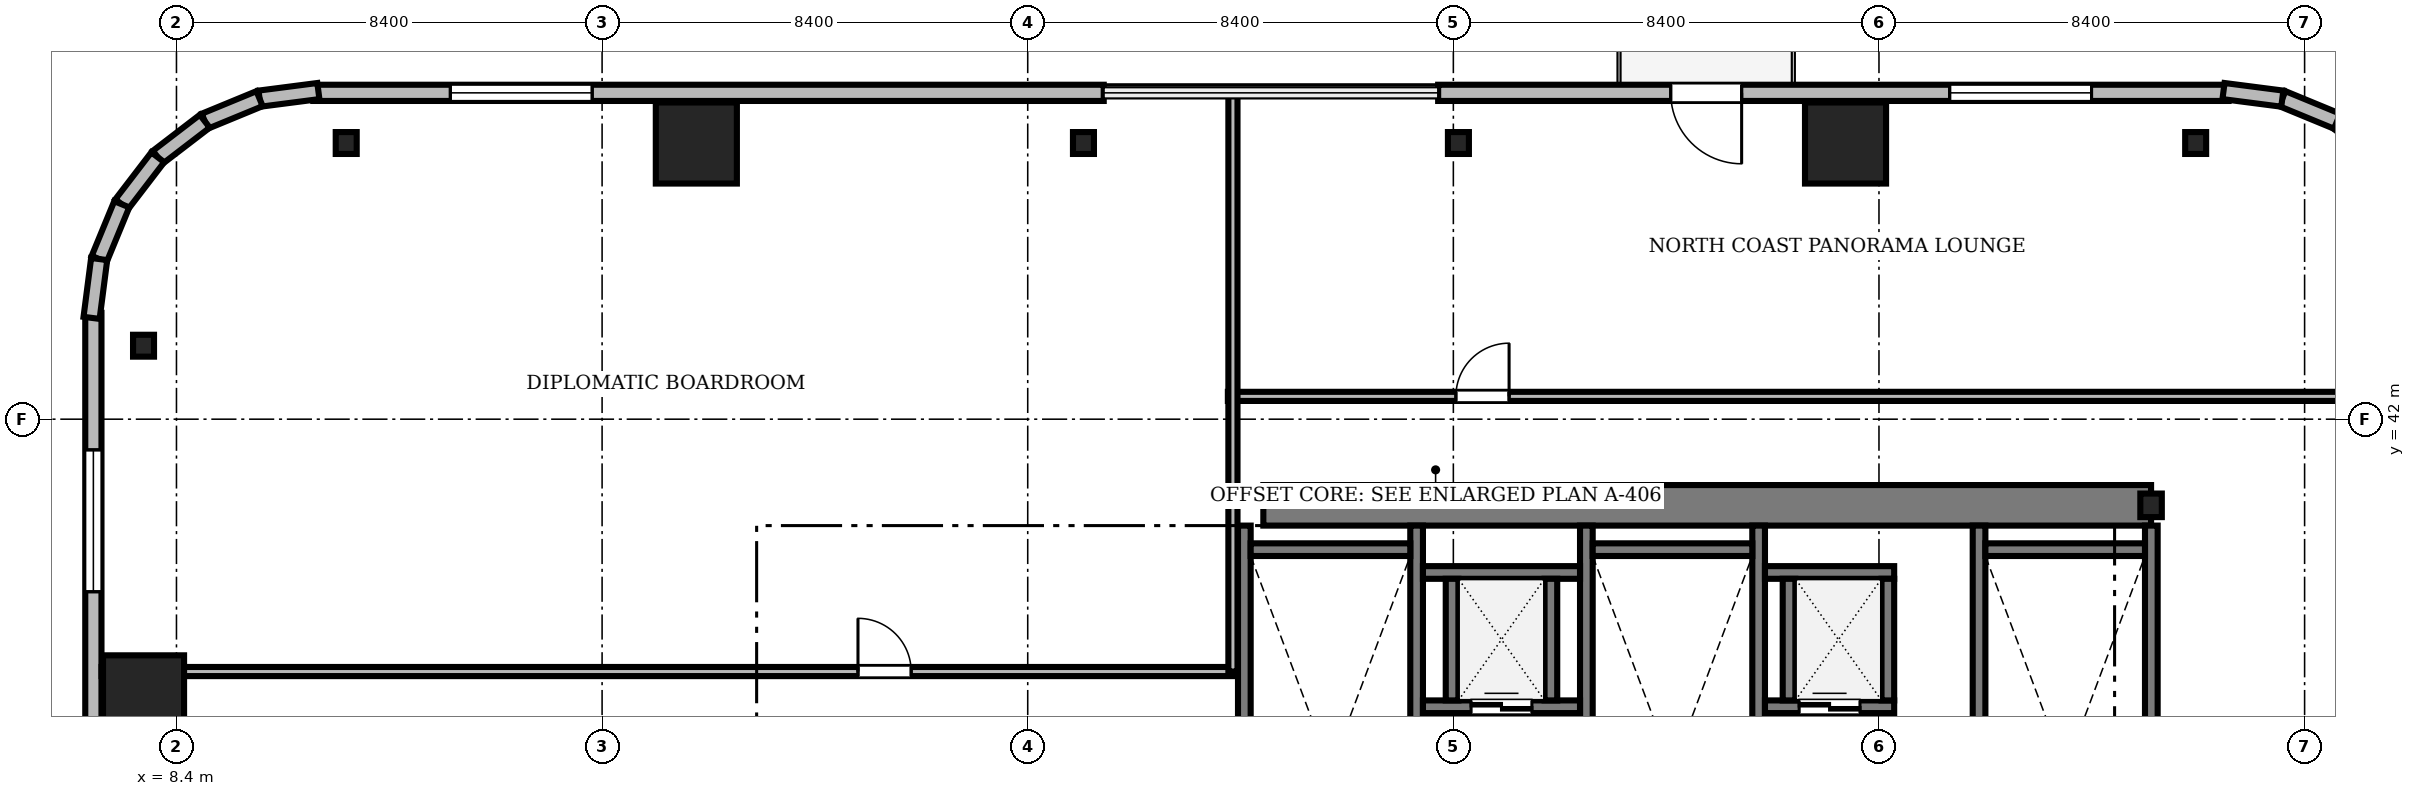
"""IFC4 building model, lengths in metres.
Left out: names, types, materials, properties, quantities, classifications, styles, units other than length and angle.
Written with IfcOpenShell. Run it as: python <this file> out.ifc"""

import sys

from ifc_helpers import new_model, si_unit, direction, frame, frame_2d, origin, origin_2d, place, context, subcontext, project, spatial, rectangle, i_section, extrude, source, transform, mapped, element, fill, save


model = new_model("IFC4")
c1 = context("Model", 3, precision=1e-05, world=origin(), true_north=direction((0.0, 1.0)))
c2 = subcontext(c1, "Body", "Model", "MODEL_VIEW")
j1 = project(units=[si_unit("LENGTHUNIT", "METRE"), si_unit("PLANEANGLEUNIT", "RADIAN")], contexts=[c1])
p1 = place(None, origin())
s1 = spatial("IfcSite", under=j1, at=p1, CompositionType="ELEMENT")
p2 = place(p1, origin())
s2 = spatial("IfcBuilding", under=s1, at=p2, CompositionType="ELEMENT")
p3 = place(p2, frame((0.0, 0.0, 140.9)))
s3 = spatial("IfcBuildingStorey", under=s2, at=p3, CompositionType="ELEMENT", Elevation=140.9)
m1 = source(origin(), c2, "Body", "SweptSolid", [
    extrude(rectangle(XDim=17.52, YDim=0.8, at=frame_2d((8.76, 0.0))), origin(), (0.0, 0.0, 1.0), 3.46),
])
p4 = place(p3, frame((29.85, 40.3, 0.0), z_axis=(0.0, 0.0, 1.0), x_axis=(1.0, 0.0, 0.0)))
e1 = element("IfcWall", 1, at=p4, inside=s3, PredefinedType="SHEAR", context=c2, shape_type="MappedRepresentation", body=[
    mapped(m1, transform((0.0, 0.0, 0.0), scale=1.0)),
])
m2 = source(origin(), c2, "Body", "SweptSolid", [
    extrude(i_section(OverallWidth=0.424, OverallDepth=0.465, WebThickness=0.035, FlangeThickness=0.056, FilletRadius=0.015, at=origin_2d()), origin(), (0.0, 0.0, 1.0), 3.46),
])
p5 = place(p3, frame((47.37, 40.3, 0.0), z_axis=(0.0, 0.0, 1.0), x_axis=(1.0, 0.0, 0.0)))
e2 = element("IfcColumn", 2, at=p5, inside=s3, PredefinedType="COLUMN", context=c2, shape_type="MappedRepresentation", body=[
    mapped(m2, transform((0.0, 0.0, 0.0), scale=1.0)),
])
m3 = source(origin(), c2, "Body", "SweptSolid", [
    extrude(rectangle(XDim=1.6, YDim=1.6, at=origin_2d()), origin(), (0.0, 0.0, 1.0), 3.46),
])
for number, where, z_axis, x_axis in (
    (3, (41.34, 47.45, 0.0), (0.0, 0.0, 1.0), (1.0, 0.0, 0.0)),
    (4, (18.66, 47.45, 0.0), (0.0, 0.0, 1.0), (1.0, 0.0, 0.0)),
    (5, (7.75, 36.54, 0.0), (0.0, 0.0, 1.0), (1.0, 0.0, 0.0)),
):
    element("IfcColumn", number, at=place(p3, frame(where, z_axis=z_axis, x_axis=x_axis)), inside=s3, PredefinedType="COLUMN", context=c2, shape_type="MappedRepresentation", body=[
        mapped(m3, transform((0.0, 0.0, 0.0), scale=1.0)),
    ])
m4 = source(origin(), c2, "Body", "SweptSolid", [
    extrude(i_section(OverallWidth=0.414, OverallDepth=0.432, WebThickness=0.026, FlangeThickness=0.04, FilletRadius=0.015, at=origin_2d()), origin(), (0.0, 0.0, 1.0), 3.46),
])
for number, where, z_axis, x_axis in (
    (6, (48.25, 47.45, 0.0), (0.0, 0.0, 1.0), (1.0, 0.0, 0.0)),
    (7, (33.7, 47.45, 0.0), (0.0, 0.0, 1.0), (1.0, 0.0, 0.0)),
    (8, (26.3, 47.45, 0.0), (0.0, 0.0, 1.0), (1.0, 0.0, 0.0)),
    (9, (11.75, 47.45, 0.0), (0.0, 0.0, 1.0), (1.0, 0.0, 0.0)),
    (10, (7.75, 43.45, 0.0), (0.0, 0.0, 1.0), (1.0, 0.0, 0.0)),
):
    element("IfcColumn", number, at=place(p3, frame(where, z_axis=z_axis, x_axis=x_axis)), inside=s3, PredefinedType="COLUMN", context=c2, shape_type="MappedRepresentation", body=[
        mapped(m4, transform((0.0, 0.0, 0.0), scale=1.0)),
    ])
m5 = source(origin(), c2, "Body", "SweptSolid", [
    extrude(rectangle(XDim=15.6, YDim=0.32, at=frame_2d((7.8, 0.0))), origin(), (0.0, 0.0, 1.0), 3.46),
])
p6 = place(p3, frame((48.9, 48.44, 0.0), z_axis=(0.0, 0.0, 1.0), x_axis=(-1.0, 0.0, 0.0)))
e11 = element("IfcWall", 11, at=p6, inside=s3, PredefinedType="SOLIDWALL", context=c2, shape_type="MappedRepresentation", body=[
    mapped(m5, transform((0.0, 0.0, 0.0), scale=1.0)),
])
m6 = source(origin(), c2, "Body", "SweptSolid", [
    extrude(rectangle(XDim=1.4, YDim=2.3, at=frame_2d((0.7, 1.15))), frame((0.0, 0.17, 0.0), z_axis=(0.0, -1.0, 0.0), x_axis=(1.0, 0.0, 0.0)), (0.0, 0.0, 1.0), 0.34),
])
p7 = place(p6, frame((9.61, 0.0, 0.0)))
e12 = element("IfcOpeningElement", 12, at=p7, cuts=e11, PredefinedType="OPENING", context=c2, shape_type="MappedRepresentation", body=[
    mapped(m6, transform((0.0, 0.0, 0.0), scale=1.0)),
])
m7 = source(origin(), c2, "Body", "SweptSolid", [
    extrude(rectangle(XDim=2.8, YDim=2.4, at=frame_2d((1.4, 1.2))), frame((0.0, 0.17, 0.0), z_axis=(0.0, -1.0, 0.0), x_axis=(1.0, 0.0, 0.0)), (0.0, 0.0, 1.0), 0.34),
])
p8 = place(p6, frame((2.705, 0.0, 0.72)))
e13 = element("IfcOpeningElement", 13, at=p8, cuts=e11, PredefinedType="OPENING", context=c2, shape_type="MappedRepresentation", body=[
    mapped(m7, transform((0.0, 0.0, 0.0), scale=1.0)),
])
p9 = place(p3, frame((26.7, 48.44, 0.0), z_axis=(0.0, 0.0, 1.0), x_axis=(-1.0, 0.0, 0.0)))
e14 = element("IfcWall", 14, at=p9, inside=s3, PredefinedType="SOLIDWALL", context=c2, shape_type="MappedRepresentation", body=[
    mapped(m5, transform((0.0, 0.0, 0.0), scale=1.0)),
])
p10 = place(p9, frame((10.095, 0.0, 0.72)))
e15 = element("IfcOpeningElement", 15, at=p10, cuts=e14, PredefinedType="OPENING", context=c2, shape_type="MappedRepresentation", body=[
    mapped(m7, transform((0.0, 0.0, 0.0), scale=1.0)),
])
m8 = source(origin(), c2, "Body", "SweptSolid", [
    extrude(rectangle(XDim=15.6, YDim=0.32, at=frame_2d((7.8, 0.0))), origin(), (0.0, 0.0, 1.0), 3.46),
])
p11 = place(p3, frame((6.76, 44.1, 0.0), z_axis=(0.0, 0.0, 1.0), x_axis=(0.0, -1.0, 0.0)))
e16 = element("IfcWall", 16, at=p11, inside=s3, PredefinedType="SOLIDWALL", context=c2, shape_type="MappedRepresentation", body=[
    mapped(m8, transform((0.0, 0.0, 0.0), scale=1.0)),
])
p12 = place(p11, frame((9.61, 0.0, 0.0)))
e17 = element("IfcOpeningElement", 17, at=p12, cuts=e16, PredefinedType="OPENING", context=c2, shape_type="MappedRepresentation", body=[
    mapped(m6, transform((0.0, 0.0, 0.0), scale=1.0)),
])
p13 = place(p11, frame((2.705, 0.0, 0.72)))
e18 = element("IfcOpeningElement", 18, at=p13, cuts=e16, PredefinedType="OPENING", context=c2, shape_type="MappedRepresentation", body=[
    mapped(m7, transform((0.0, 0.0, 0.0), scale=1.0)),
])
m9 = source(origin(), c2, "Body", "SweptSolid", [
    extrude(rectangle(XDim=1.169, YDim=0.32, at=frame_2d((0.584, 0.0))), origin(), (0.0, 0.0, 1.0), 3.46),
])
p14 = place(p3, frame((51.969, 47.169, 0.0), z_axis=(0.0, 0.0, 1.0), x_axis=(-0.793663520347, 0.608356981114, 0.0)))
e19 = element("IfcWall", 19, at=p14, inside=s3, PredefinedType="SOLIDWALL", context=c2, shape_type="MappedRepresentation", body=[
    mapped(m9, transform((0.0, 0.0, 0.0), scale=1.0)),
])
m10 = source(origin(), c2, "Body", "SweptSolid", [
    extrude(rectangle(XDim=1.169, YDim=0.32, at=frame_2d((0.584, 0.0))), origin(), (0.0, 0.0, 1.0), 3.46),
])
p15 = place(p3, frame((51.041, 47.88, 0.0), z_axis=(0.0, 0.0, 1.0), x_axis=(-0.924552646638, 0.381054331552, 0.0)))
e20 = element("IfcWall", 20, at=p15, inside=s3, PredefinedType="SOLIDWALL", context=c2, shape_type="MappedRepresentation", body=[
    mapped(m10, transform((0.0, 0.0, 0.0), scale=1.0)),
])
m11 = source(origin(), c2, "Body", "SweptSolid", [
    extrude(rectangle(XDim=1.17, YDim=0.32, at=frame_2d((0.585, 0.0))), origin(), (0.0, 0.0, 1.0), 3.46),
])
for number, where, z_axis, x_axis in (
    (21, (49.96, 48.325, 0.0), (0.0, 0.0, 1.0), (-0.992, 0.128, 0.0)),
    (22, (11.2, 48.476, 0.0), (0.0, 0.0, 1.0), (-0.992, -0.128, 0.0)),
):
    element("IfcWall", number, at=place(p3, frame(where, z_axis=z_axis, x_axis=x_axis)), inside=s3, PredefinedType="SOLIDWALL", context=c2, shape_type="MappedRepresentation", body=[
        mapped(m11, transform((0.0, 0.0, 0.0), scale=1.0)),
    ])
p16 = place(p3, frame((10.04, 48.325, 0.0), z_axis=(0.0, 0.0, 1.0), x_axis=(-0.924552646638, -0.381054331552, 0.0)))
e23 = element("IfcWall", 23, at=p16, inside=s3, PredefinedType="SOLIDWALL", context=c2, shape_type="MappedRepresentation", body=[
    mapped(m10, transform((0.0, 0.0, 0.0), scale=1.0)),
])
p17 = place(p3, frame((8.959, 47.88, 0.0), z_axis=(0.0, 0.0, 1.0), x_axis=(-0.793663520347, -0.608356981114, 0.0)))
e24 = element("IfcWall", 24, at=p17, inside=s3, PredefinedType="SOLIDWALL", context=c2, shape_type="MappedRepresentation", body=[
    mapped(m9, transform((0.0, 0.0, 0.0), scale=1.0)),
])
m12 = source(origin(), c2, "Body", "SweptSolid", [
    extrude(rectangle(XDim=1.169, YDim=0.32, at=frame_2d((0.584, 0.0))), origin(), (0.0, 0.0, 1.0), 3.46),
])
p18 = place(p3, frame((8.031, 47.169, 0.0), z_axis=(0.0, 0.0, 1.0), x_axis=(-0.608387696831, -0.793639975269, 0.0)))
e25 = element("IfcWall", 25, at=p18, inside=s3, PredefinedType="SOLIDWALL", context=c2, shape_type="MappedRepresentation", body=[
    mapped(m12, transform((0.0, 0.0, 0.0), scale=1.0)),
])
p19 = place(p3, frame((7.32, 46.241, 0.0), z_axis=(0.0, 0.0, 1.0), x_axis=(-0.381054331552, -0.924552646638, 0.0)))
e26 = element("IfcWall", 26, at=p19, inside=s3, PredefinedType="SOLIDWALL", context=c2, shape_type="MappedRepresentation", body=[
    mapped(m10, transform((0.0, 0.0, 0.0), scale=1.0)),
])
p20 = place(p3, frame((6.875, 45.16, 0.0), z_axis=(0.0, 0.0, 1.0), x_axis=(-0.128295670475, -0.991735963317, 0.0)))
e27 = element("IfcWall", 27, at=p20, inside=s3, PredefinedType="SOLIDWALL", context=c2, shape_type="MappedRepresentation", body=[
    mapped(m11, transform((0.0, 0.0, 0.0), scale=1.0)),
])
m13 = source(origin(), c2, "Body", "SweptSolid", [
    extrude(rectangle(XDim=9.25, YDim=0.25, at=frame_2d((4.625, 0.0))), origin(), (0.0, 0.0, 1.0), 3.5),
])
for number, where, z_axis, x_axis in (
    (28, (29.475, 30.65, 0.0), (0.0, 0.0, 1.0), (0.0, 1.0, 0.0)),
    (29, (32.875, 30.65, 0.0), (0.0, 0.0, 1.0), (0.0, 1.0, 0.0)),
):
    element("IfcWall", number, at=place(p3, frame(where, z_axis=z_axis, x_axis=x_axis)), inside=s3, PredefinedType="SOLIDWALL", context=c2, shape_type="MappedRepresentation", body=[
        mapped(m13, transform((0.0, 0.0, 0.0), scale=1.0)),
    ])
m14 = source(origin(), c2, "Body", "SweptSolid", [
    extrude(rectangle(XDim=3.15, YDim=0.25, at=frame_2d((1.575, 0.0))), origin(), (0.0, 0.0, 1.0), 3.5),
])
p21 = place(p3, frame((29.6, 39.425, 0.0), z_axis=(0.0, 0.0, 1.0), x_axis=(1.0, 0.0, 0.0)))
e30 = element("IfcWall", 30, at=p21, inside=s3, PredefinedType="SOLIDWALL", context=c2, shape_type="MappedRepresentation", body=[
    mapped(m14, transform((0.0, 0.0, 0.0), scale=1.0)),
])
for number, where, z_axis, x_axis in (
    (31, (36.225, 30.65, 0.0), (0.0, 0.0, 1.0), (0.0, 1.0, 0.0)),
    (32, (39.625, 30.65, 0.0), (0.0, 0.0, 1.0), (0.0, 1.0, 0.0)),
):
    element("IfcWall", number, at=place(p3, frame(where, z_axis=z_axis, x_axis=x_axis)), inside=s3, PredefinedType="SOLIDWALL", context=c2, shape_type="MappedRepresentation", body=[
        mapped(m13, transform((0.0, 0.0, 0.0), scale=1.0)),
    ])
p22 = place(p3, frame((36.35, 39.425, 0.0), z_axis=(0.0, 0.0, 1.0), x_axis=(1.0, 0.0, 0.0)))
e33 = element("IfcWall", 33, at=p22, inside=s3, PredefinedType="SOLIDWALL", context=c2, shape_type="MappedRepresentation", body=[
    mapped(m14, transform((0.0, 0.0, 0.0), scale=1.0)),
])
for number, where, z_axis, x_axis in (
    (34, (43.975, 30.65, 0.0), (0.0, 0.0, 1.0), (0.0, 1.0, 0.0)),
    (35, (47.375, 30.65, 0.0), (0.0, 0.0, 1.0), (0.0, 1.0, 0.0)),
):
    element("IfcWall", number, at=place(p3, frame(where, z_axis=z_axis, x_axis=x_axis)), inside=s3, PredefinedType="SOLIDWALL", context=c2, shape_type="MappedRepresentation", body=[
        mapped(m13, transform((0.0, 0.0, 0.0), scale=1.0)),
    ])
p23 = place(p3, frame((44.1, 39.425, 0.0), z_axis=(0.0, 0.0, 1.0), x_axis=(1.0, 0.0, 0.0)))
e36 = element("IfcWall", 36, at=p23, inside=s3, PredefinedType="SOLIDWALL", context=c2, shape_type="MappedRepresentation", body=[
    mapped(m14, transform((0.0, 0.0, 0.0), scale=1.0)),
])
m15 = source(origin(), c2, "Body", "SweptSolid", [
    extrude(rectangle(XDim=3.1, YDim=0.25, at=frame_2d((1.55, 0.0))), origin(), (0.0, 0.0, 1.0), 3.46),
])
p24 = place(p3, frame((33.0, 36.325, 0.0), z_axis=(0.0, 0.0, 1.0), x_axis=(1.0, 0.0, 0.0)))
e37 = element("IfcWall", 37, at=p24, inside=s3, PredefinedType="SOLIDWALL", context=c2, shape_type="MappedRepresentation", body=[
    mapped(m15, transform((0.0, 0.0, 0.0), scale=1.0)),
])
m16 = source(origin(), c2, "Body", "SweptSolid", [
    extrude(rectangle(XDim=1.2, YDim=2.25, at=frame_2d((0.6, 1.125))), frame((0.0, 0.135, 0.0), z_axis=(0.0, -1.0, 0.0), x_axis=(1.0, 0.0, 0.0)), (0.0, 0.0, 1.0), 0.27),
])
p25 = place(p24, frame((0.95, 0.0, 0.0)))
e38 = element("IfcOpeningElement", 38, at=p25, cuts=e37, PredefinedType="OPENING", context=c2, shape_type="MappedRepresentation", body=[
    mapped(m16, transform((0.0, 0.0, 0.0), scale=1.0)),
])
p26 = place(p3, frame((33.0, 38.975, 0.0), z_axis=(0.0, 0.0, 1.0), x_axis=(1.0, 0.0, 0.0)))
e39 = element("IfcWall", 39, at=p26, inside=s3, PredefinedType="SOLIDWALL", context=c2, shape_type="MappedRepresentation", body=[
    mapped(m15, transform((0.0, 0.0, 0.0), scale=1.0)),
])
m17 = source(origin(), c2, "Body", "SweptSolid", [
    extrude(rectangle(XDim=2.4, YDim=0.25, at=frame_2d((1.2, 0.0))), origin(), (0.0, 0.0, 1.0), 3.46),
])
for number, where, z_axis, x_axis in (
    (40, (33.575, 36.45, 0.0), (0.0, 0.0, 1.0), (0.0, 1.0, 0.0)),
    (41, (35.525, 36.45, 0.0), (0.0, 0.0, 1.0), (0.0, 1.0, 0.0)),
):
    element("IfcWall", number, at=place(p3, frame(where, z_axis=z_axis, x_axis=x_axis)), inside=s3, PredefinedType="SOLIDWALL", context=c2, shape_type="MappedRepresentation", body=[
        mapped(m17, transform((0.0, 0.0, 0.0), scale=1.0)),
    ])
m18 = source(origin(), c2, "Body", "SweptSolid", [
    extrude(rectangle(XDim=2.55, YDim=0.25, at=frame_2d((1.275, 0.0))), origin(), (0.0, 0.0, 1.0), 3.46),
])
p27 = place(p3, frame((39.75, 36.325, 0.0), z_axis=(0.0, 0.0, 1.0), x_axis=(1.0, 0.0, 0.0)))
e42 = element("IfcWall", 42, at=p27, inside=s3, PredefinedType="SOLIDWALL", context=c2, shape_type="MappedRepresentation", body=[
    mapped(m18, transform((0.0, 0.0, 0.0), scale=1.0)),
])
p28 = place(p27, frame((0.675, 0.0, 0.0)))
e43 = element("IfcOpeningElement", 43, at=p28, cuts=e42, PredefinedType="OPENING", context=c2, shape_type="MappedRepresentation", body=[
    mapped(m16, transform((0.0, 0.0, 0.0), scale=1.0)),
])
p29 = place(p3, frame((39.75, 38.975, 0.0), z_axis=(0.0, 0.0, 1.0), x_axis=(1.0, 0.0, 0.0)))
e44 = element("IfcWall", 44, at=p29, inside=s3, PredefinedType="SOLIDWALL", context=c2, shape_type="MappedRepresentation", body=[
    mapped(m18, transform((0.0, 0.0, 0.0), scale=1.0)),
])
for number, where, z_axis, x_axis in (
    (45, (40.225, 36.45, 0.0), (0.0, 0.0, 1.0), (0.0, 1.0, 0.0)),
    (46, (42.175, 36.45, 0.0), (0.0, 0.0, 1.0), (0.0, 1.0, 0.0)),
):
    element("IfcWall", number, at=place(p3, frame(where, z_axis=z_axis, x_axis=x_axis)), inside=s3, PredefinedType="SOLIDWALL", context=c2, shape_type="MappedRepresentation", body=[
        mapped(m17, transform((0.0, 0.0, 0.0), scale=1.0)),
    ])
m19 = source(origin(), c2, "Body", "SweptSolid", [
    extrude(rectangle(XDim=23.928, YDim=0.18, at=frame_2d((11.964, 0.0))), origin(), (0.0, 0.0, 1.0), 2.702),
])
p30 = place(p3, frame((29.15, 42.45, 0.0), z_axis=(0.0, 0.0, 1.0), x_axis=(1.0, 0.0, 0.0)))
e47 = element("IfcWall", 47, at=p30, inside=s3, PredefinedType="PARTITIONING", context=c2, shape_type="MappedRepresentation", body=[
    mapped(m19, transform((0.0, 0.0, 0.0), scale=1.0)),
])
m20 = source(origin(), c2, "Body", "SweptSolid", [
    extrude(rectangle(XDim=1.05, YDim=2.2, at=frame_2d((0.525, 1.1))), frame((0.0, 0.1, 0.0), z_axis=(0.0, -1.0, 0.0), x_axis=(1.0, 0.0, 0.0)), (0.0, 0.0, 1.0), 0.2),
])
p31 = place(p30, frame((4.5, 0.0, 0.0)))
e48 = element("IfcOpeningElement", 48, at=p31, cuts=e47, PredefinedType="OPENING", context=c2, shape_type="MappedRepresentation", body=[
    mapped(m20, transform((0.0, 0.0, 0.0), scale=1.0)),
])
m21 = source(origin(), c2, "Body", "SweptSolid", [
    extrude(rectangle(XDim=22.328, YDim=0.18, at=frame_2d((11.164, 0.0))), origin(), (0.0, 0.0, 1.0), 2.702),
])
p32 = place(p3, frame((6.922, 37.02, 0.0), z_axis=(0.0, 0.0, 1.0), x_axis=(1.0, 0.0, 0.0)))
e49 = element("IfcWall", 49, at=p32, inside=s3, PredefinedType="PARTITIONING", context=c2, shape_type="MappedRepresentation", body=[
    mapped(m21, transform((0.0, 0.0, 0.0), scale=1.0)),
])
p33 = place(p32, frame((14.928, 0.0, 0.0)))
e50 = element("IfcOpeningElement", 50, at=p33, cuts=e49, PredefinedType="OPENING", context=c2, shape_type="MappedRepresentation", body=[
    mapped(m20, transform((0.0, 0.0, 0.0), scale=1.0)),
])
m22 = source(origin(), c2, "Body", "SweptSolid", [
    extrude(rectangle(XDim=11.45, YDim=0.18, at=frame_2d((5.725, 0.0))), origin(), (0.0, 0.0, 1.0), 2.702),
])
p34 = place(p3, frame((29.25, 37.02, 0.0), z_axis=(0.0, 0.0, 1.0), x_axis=(0.0, 1.0, 0.0)))
e51 = element("IfcWall", 51, at=p34, inside=s3, PredefinedType="PARTITIONING", context=c2, shape_type="MappedRepresentation", body=[
    mapped(m22, transform((0.0, 0.0, 0.0), scale=1.0)),
])
m23 = source(origin(), c2, "Body", "SweptSolid", [
    extrude(rectangle(XDim=1.4, YDim=2.3, at=frame_2d((0.7, 1.15))), frame((0.0, 0.025, 0.0), z_axis=(0.0, -1.0, 0.0), x_axis=(1.0, 0.0, 0.0)), (0.0, 0.0, 1.0), 0.05),
])
p35 = place(p7, frame((1.4, 0.0, 0.0), z_axis=(0.0, 0.0, 1.0), x_axis=(-1.0, 0.0, 0.0)))
e52 = element("IfcDoor", 52, at=p35, inside=s3, OperationType="DOUBLE_DOOR_SLIDING", PredefinedType="DOOR", context=c2, shape_type="MappedRepresentation", body=[
    mapped(m23, transform((0.0, 0.0, 0.0), scale=1.0)),
])
fill(e12, e52)
m24 = source(origin(), c2, "Body", "SweptSolid", [
    extrude(rectangle(XDim=2.8, YDim=2.4, at=frame_2d((1.4, 1.2))), frame((0.0, 0.03, 0.0), z_axis=(0.0, -1.0, 0.0), x_axis=(1.0, 0.0, 0.0)), (0.0, 0.0, 1.0), 0.06),
])
p36 = place(p8, origin())
e53 = element("IfcWindow", 53, at=p36, inside=s3, PartitioningType="SINGLE_PANEL", PredefinedType="WINDOW", context=c2, shape_type="MappedRepresentation", body=[
    mapped(m24, transform((0.0, 0.0, 0.0), scale=1.0)),
])
fill(e13, e53)
p37 = place(p10, origin())
e54 = element("IfcWindow", 54, at=p37, inside=s3, PartitioningType="SINGLE_PANEL", PredefinedType="WINDOW", context=c2, shape_type="MappedRepresentation", body=[
    mapped(m24, transform((0.0, 0.0, 0.0), scale=1.0)),
])
fill(e15, e54)
p38 = place(p13, origin())
e55 = element("IfcWindow", 55, at=p38, inside=s3, PartitioningType="SINGLE_PANEL", PredefinedType="WINDOW", context=c2, shape_type="MappedRepresentation", body=[
    mapped(m24, transform((0.0, 0.0, 0.0), scale=1.0)),
])
fill(e18, e55)
m25 = source(origin(), c2, "Body", "SweptSolid", [
    extrude(rectangle(XDim=1.2, YDim=2.25, at=frame_2d((0.6, 1.125))), frame((0.0, 0.025, 0.0), z_axis=(0.0, -1.0, 0.0), x_axis=(1.0, 0.0, 0.0)), (0.0, 0.0, 1.0), 0.05),
])
p39 = place(p25, origin())
e56 = element("IfcDoor", 56, at=p39, inside=s3, OperationType="DOUBLE_DOOR_SLIDING", PredefinedType="DOOR", context=c2, shape_type="MappedRepresentation", body=[
    mapped(m25, transform((0.0, 0.0, 0.0), scale=1.0)),
])
fill(e38, e56)
p40 = place(p28, origin())
e57 = element("IfcDoor", 57, at=p40, inside=s3, OperationType="DOUBLE_DOOR_SLIDING", PredefinedType="DOOR", context=c2, shape_type="MappedRepresentation", body=[
    mapped(m25, transform((0.0, 0.0, 0.0), scale=1.0)),
])
fill(e43, e57)
m26 = source(origin(), c2, "Body", "SweptSolid", [
    extrude(rectangle(XDim=1.05, YDim=2.2, at=frame_2d((0.525, 1.1))), frame((0.0, 0.025, 0.0), z_axis=(0.0, -1.0, 0.0), x_axis=(1.0, 0.0, 0.0)), (0.0, 0.0, 1.0), 0.05),
])
p41 = place(p31, origin())
e58 = element("IfcDoor", 58, at=p41, inside=s3, OperationType="SINGLE_SWING_RIGHT", PredefinedType="DOOR", context=c2, shape_type="MappedRepresentation", body=[
    mapped(m26, transform((0.0, 0.0, 0.0), scale=1.0)),
])
fill(e48, e58)
p42 = place(p33, origin())
e59 = element("IfcDoor", 59, at=p42, inside=s3, OperationType="SINGLE_SWING_LEFT", PredefinedType="DOOR", context=c2, shape_type="MappedRepresentation", body=[
    mapped(m26, transform((0.0, 0.0, 0.0), scale=1.0)),
])
fill(e50, e59)
save(model, sys.argv[1])
